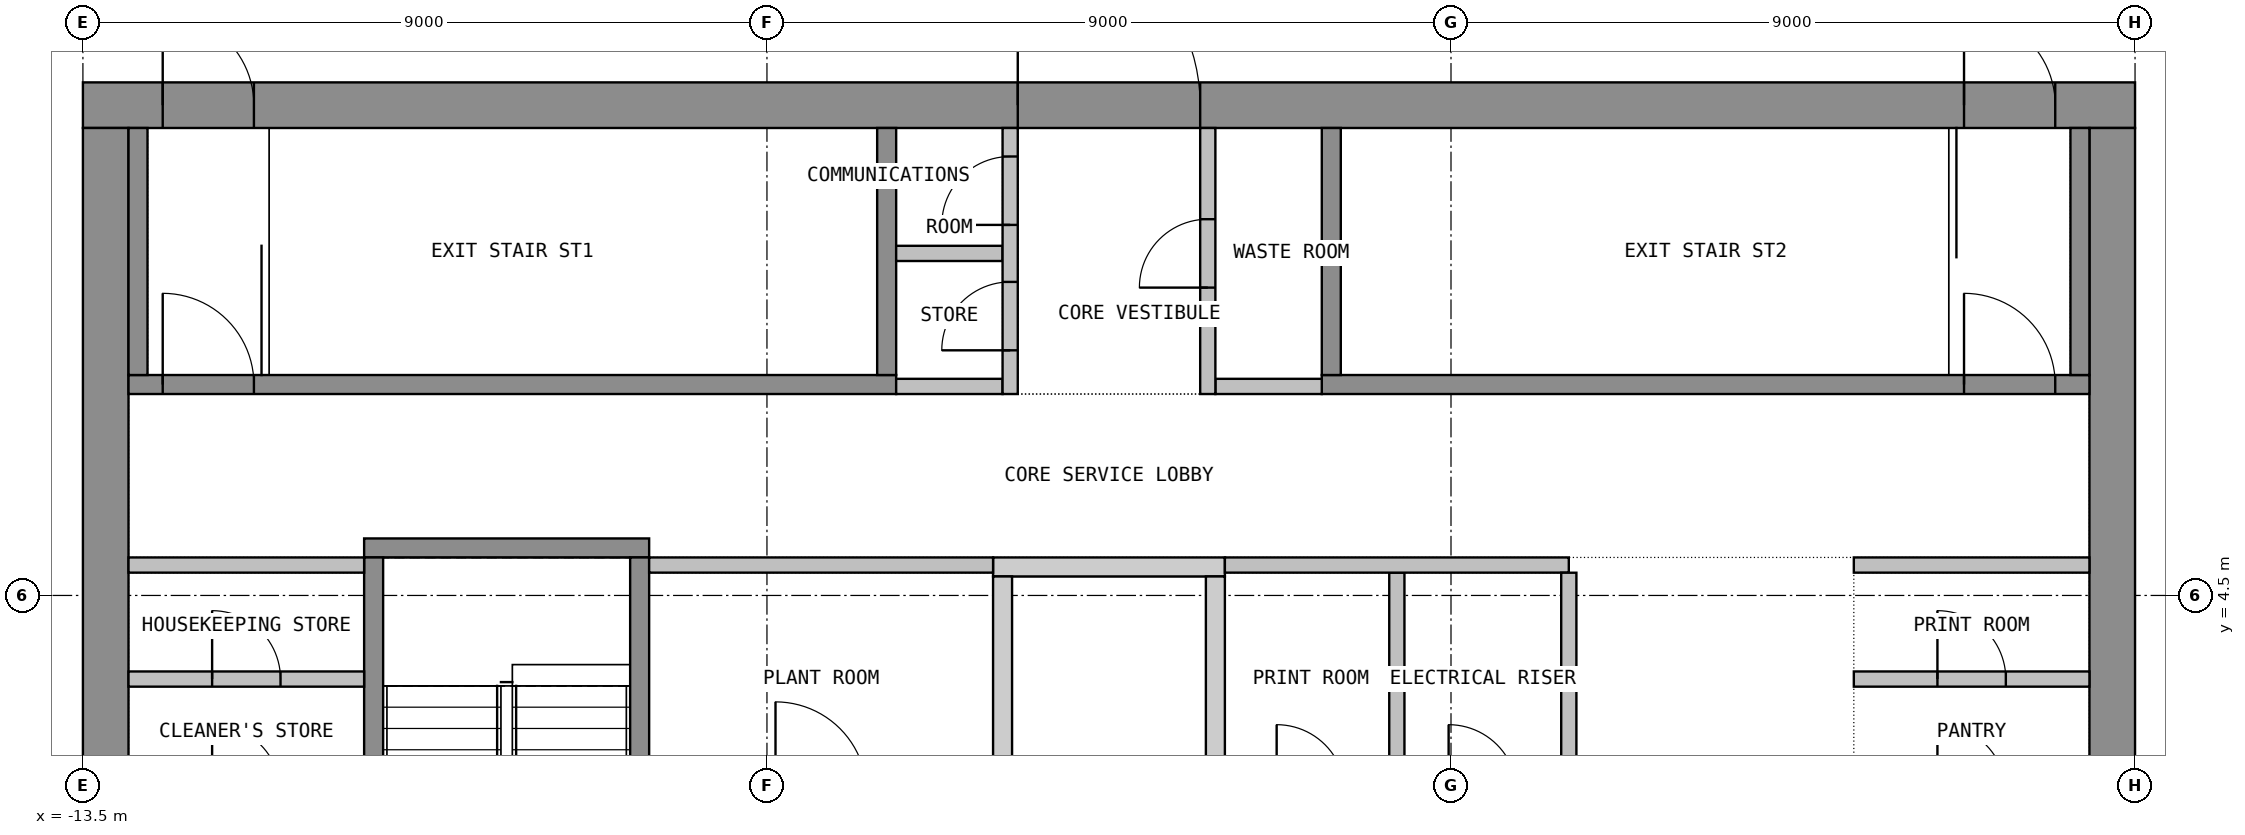
"""IFC4 building model, lengths in metres.
Left out: names, types, materials, properties, quantities, classifications, styles, units other than length and angle.
Written with IfcOpenShell. Run it as: python <this file> out.ifc"""

import sys

from ifc_helpers import new_model, si_unit, direction, frame, frame_2d, origin, place, context, subcontext, project, spatial, polyline, rectangle, outline, extrude, element, fill, save


model = new_model("IFC4")
c1 = context("Model", 3, precision=1e-05, world=origin(), true_north=direction((0.0, 1.0)))
c2 = subcontext(c1, "Body", "Model", "MODEL_VIEW")
j1 = project(units=[si_unit("LENGTHUNIT", "METRE"), si_unit("PLANEANGLEUNIT", "RADIAN")], contexts=[c1])
p1 = place(None, origin())
s1 = spatial("IfcSite", under=j1, at=p1, CompositionType="ELEMENT")
p2 = place(p1, origin())
s2 = spatial("IfcBuilding", under=s1, at=p2, CompositionType="ELEMENT")
p3 = place(p2, frame((0.0, 0.0, 318.9)))
s3 = spatial("IfcBuildingStorey", under=s2, at=p3, CompositionType="ELEMENT", Elevation=318.9)
p4 = place(p3, frame((-13.5, 10.95, 0.0), z_axis=(0.0, 0.0, 1.0), x_axis=(1.0, 0.0, 0.0)))
e1 = element("IfcWall", 1, at=p4, inside=s3, PredefinedType="SHEAR", context=c2, shape_type="SweptSolid", body=[
    extrude(rectangle(XDim=27.0, YDim=0.6, at=frame_2d((13.5, 0.0))), origin(), (0.0, 0.0, 1.0), 3.6),
])
p5 = place(p4, frame((12.3, 0.0, 0.0)))
e2 = element("IfcOpeningElement", 2, at=p5, cuts=e1, PredefinedType="OPENING", context=c2, shape_type="SweptSolid", body=[
    extrude(rectangle(XDim=2.4, YDim=2.1, at=frame_2d((1.2, 1.05))), frame((0.0, 0.31, 0.0), z_axis=(0.0, -1.0, 0.0), x_axis=(1.0, 0.0, 0.0)), (0.0, 0.0, 1.0), 0.62),
])
p6 = place(p4, frame((1.05, 0.0, 0.0)))
e3 = element("IfcOpeningElement", 3, at=p6, cuts=e1, PredefinedType="OPENING", context=c2, shape_type="SweptSolid", body=[
    extrude(rectangle(XDim=1.2, YDim=2.1, at=frame_2d((0.6, 1.05))), frame((0.0, 0.31, 0.0), z_axis=(0.0, -1.0, 0.0), x_axis=(1.0, 0.0, 0.0)), (0.0, 0.0, 1.0), 0.62),
])
p7 = place(p4, frame((24.75, 0.0, 0.0)))
e4 = element("IfcOpeningElement", 4, at=p7, cuts=e1, PredefinedType="OPENING", context=c2, shape_type="SweptSolid", body=[
    extrude(rectangle(XDim=1.2, YDim=2.1, at=frame_2d((0.6, 1.05))), frame((0.0, 0.31, 0.0), z_axis=(0.0, -1.0, 0.0), x_axis=(1.0, 0.0, 0.0)), (0.0, 0.0, 1.0), 0.62),
])
p8 = place(p3, frame((-13.2, -10.65, 0.0), z_axis=(0.0, 0.0, 1.0), x_axis=(0.0, 1.0, 0.0)))
e5 = element("IfcWall", 5, at=p8, inside=s3, PredefinedType="SHEAR", context=c2, shape_type="SweptSolid", body=[
    extrude(rectangle(XDim=21.3, YDim=0.6, at=frame_2d((10.65, 0.0))), origin(), (0.0, 0.0, 1.0), 3.6),
])
p9 = place(p8, frame((9.45, 0.0, 0.0)))
e6 = element("IfcOpeningElement", 6, at=p9, cuts=e5, PredefinedType="OPENING", context=c2, shape_type="SweptSolid", body=[
    extrude(rectangle(XDim=2.4, YDim=2.1, at=frame_2d((1.2, 1.05))), frame((0.0, 0.31, 0.0), z_axis=(0.0, -1.0, 0.0), x_axis=(1.0, 0.0, 0.0)), (0.0, 0.0, 1.0), 0.62),
])
p10 = place(p3, frame((13.2, -10.65, 0.0), z_axis=(0.0, 0.0, 1.0), x_axis=(0.0, 1.0, 0.0)))
e7 = element("IfcWall", 7, at=p10, inside=s3, PredefinedType="SHEAR", context=c2, shape_type="SweptSolid", body=[
    extrude(rectangle(XDim=21.3, YDim=0.6, at=frame_2d((10.65, 0.0))), origin(), (0.0, 0.0, 1.0), 3.6),
])
p11 = place(p10, frame((9.45, 0.0, 0.0)))
e8 = element("IfcOpeningElement", 8, at=p11, cuts=e7, PredefinedType="OPENING", context=c2, shape_type="SweptSolid", body=[
    extrude(rectangle(XDim=2.4, YDim=2.1, at=frame_2d((1.2, 1.05))), frame((0.0, 0.31, 0.0), z_axis=(0.0, -1.0, 0.0), x_axis=(1.0, 0.0, 0.0)), (0.0, 0.0, 1.0), 0.62),
])
p12 = place(p3, origin())
e9 = element("IfcWall", 9, at=p12, inside=s3, PredefinedType="SHEAR", context=c2, shape_type="SweptSolid", body=[
    extrude(outline(polyline([(-1.525, 4.75), (1.525, 4.75), (1.525, 5.0), (-1.525, 5.0), (-1.525, 4.75)])), origin(), (0.0, 0.0, 1.0), 3.6),
])
p13 = place(p3, origin())
e10 = element("IfcWall", 10, at=p13, inside=s3, PredefinedType="SHEAR", context=c2, shape_type="SweptSolid", body=[
    extrude(outline(polyline([(-1.525, 2.05), (-1.275, 2.05), (-1.275, 4.75), (-1.525, 4.75), (-1.525, 2.05)])), origin(), (0.0, 0.0, 1.0), 3.6),
])
p14 = place(p3, origin())
e11 = element("IfcWall", 11, at=p14, inside=s3, PredefinedType="SHEAR", context=c2, shape_type="SweptSolid", body=[
    extrude(outline(polyline([(1.275, 2.05), (1.525, 2.05), (1.525, 4.75), (1.275, 4.75), (1.275, 2.05)])), origin(), (0.0, 0.0, 1.0), 3.6),
])
p15 = place(p3, frame((-12.9, 7.275, 0.0), z_axis=(0.0, 0.0, 1.0), x_axis=(1.0, 0.0, 0.0)))
e12 = element("IfcWall", 12, at=p15, inside=s3, PredefinedType="SHEAR", context=c2, shape_type="SweptSolid", body=[
    extrude(rectangle(XDim=10.1, YDim=0.25, at=frame_2d((5.05, 0.0))), origin(), (0.0, 0.0, 1.0), 3.6),
])
p16 = place(p15, frame((0.45, 0.0, 0.0)))
e13 = element("IfcOpeningElement", 13, at=p16, cuts=e12, PredefinedType="OPENING", context=c2, shape_type="SweptSolid", body=[
    extrude(rectangle(XDim=1.2, YDim=2.1, at=frame_2d((0.6, 1.05))), frame((0.0, 0.135, 0.0), z_axis=(0.0, -1.0, 0.0), x_axis=(1.0, 0.0, 0.0)), (0.0, 0.0, 1.0), 0.27),
])
for number, where, z_axis, x_axis in (
    (14, (-12.775, 7.4, 0.0), (0.0, 0.0, 1.0), (0.0, 1.0, 0.0)),
    (15, (-2.925, 7.4, 0.0), (0.0, 0.0, 1.0), (0.0, 1.0, 0.0)),
):
    element("IfcWall", number, at=place(p3, frame(where, z_axis=z_axis, x_axis=x_axis)), inside=s3, PredefinedType="SHEAR", context=c2, shape_type="SweptSolid", body=[
        extrude(rectangle(XDim=3.25, YDim=0.25, at=frame_2d((1.625, 0.0))), origin(), (0.0, 0.0, 1.0), 3.6),
    ])
p17 = place(p3, frame((2.8, 7.275, 0.0), z_axis=(0.0, 0.0, 1.0), x_axis=(1.0, 0.0, 0.0)))
e16 = element("IfcWall", 16, at=p17, inside=s3, PredefinedType="SHEAR", context=c2, shape_type="SweptSolid", body=[
    extrude(rectangle(XDim=10.1, YDim=0.25, at=frame_2d((5.05, 0.0))), origin(), (0.0, 0.0, 1.0), 3.6),
])
p18 = place(p17, frame((8.45, 0.0, 0.0)))
e17 = element("IfcOpeningElement", 17, at=p18, cuts=e16, PredefinedType="OPENING", context=c2, shape_type="SweptSolid", body=[
    extrude(rectangle(XDim=1.2, YDim=2.1, at=frame_2d((0.6, 1.05))), frame((0.0, 0.135, 0.0), z_axis=(0.0, -1.0, 0.0), x_axis=(1.0, 0.0, 0.0)), (0.0, 0.0, 1.0), 0.27),
])
for number, where, z_axis, x_axis in (
    (18, (2.925, 7.4, 0.0), (0.0, 0.0, 1.0), (0.0, 1.0, 0.0)),
    (19, (12.775, 7.4, 0.0), (0.0, 0.0, 1.0), (0.0, 1.0, 0.0)),
):
    element("IfcWall", number, at=place(p3, frame(where, z_axis=z_axis, x_axis=x_axis)), inside=s3, PredefinedType="SHEAR", context=c2, shape_type="SweptSolid", body=[
        extrude(rectangle(XDim=3.25, YDim=0.25, at=frame_2d((1.625, 0.0))), origin(), (0.0, 0.0, 1.0), 3.6),
    ])
p19 = place(p3, frame((-9.8, 5.125, 0.0), z_axis=(0.0, 0.0, 1.0), x_axis=(1.0, 0.0, 0.0)))
e20 = element("IfcWall", 20, at=p19, inside=s3, PredefinedType="SHEAR", context=c2, shape_type="SweptSolid", body=[
    extrude(rectangle(XDim=3.75, YDim=0.25, at=frame_2d((1.875, 0.0))), origin(), (0.0, 0.0, 1.0), 3.6),
])
p20 = place(p3, frame((-9.675, -1.6, 0.0), z_axis=(0.0, 0.0, 1.0), x_axis=(0.0, 1.0, 0.0)))
e21 = element("IfcWall", 21, at=p20, inside=s3, PredefinedType="SHEAR", context=c2, shape_type="SweptSolid", body=[
    extrude(rectangle(XDim=6.6, YDim=0.25, at=frame_2d((3.3, 0.0))), origin(), (0.0, 0.0, 1.0), 3.6),
])
p21 = place(p3, frame((-6.175, -1.6, 0.0), z_axis=(0.0, 0.0, 1.0), x_axis=(0.0, 1.0, 0.0)))
e22 = element("IfcWall", 22, at=p21, inside=s3, PredefinedType="SHEAR", context=c2, shape_type="SweptSolid", body=[
    extrude(rectangle(XDim=6.6, YDim=0.25, at=frame_2d((3.3, 0.0))), origin(), (0.0, 0.0, 1.0), 3.6),
])
p22 = place(p21, frame((0.2, 0.0, 0.0)))
e23 = element("IfcOpeningElement", 23, at=p22, cuts=e22, PredefinedType="OPENING", context=c2, shape_type="SweptSolid", body=[
    extrude(rectangle(XDim=1.2, YDim=2.1, at=frame_2d((0.6, 1.05))), frame((0.0, 0.135, 0.0), z_axis=(0.0, -1.0, 0.0), x_axis=(1.0, 0.0, 0.0)), (0.0, 0.0, 1.0), 0.27),
])
for number, where, z_axis, x_axis in (
    (24, (-2.8, 7.25, 0.0), (0.0, 0.0, 1.0), (1.0, 0.0, 0.0)),
    (25, (-2.8, 9.0, 0.0), (0.0, 0.0, 1.0), (1.0, 0.0, 0.0)),
    (26, (1.4, 7.25, 0.0), (0.0, 0.0, 1.0), (1.0, 0.0, 0.0)),
):
    element("IfcWall", number, at=place(p3, frame(where, z_axis=z_axis, x_axis=x_axis)), inside=s3, PredefinedType="PARTITIONING", context=c2, shape_type="SweptSolid", body=[
        extrude(rectangle(XDim=1.4, YDim=0.2, at=frame_2d((0.7, 0.0))), origin(), (0.0, 0.0, 1.0), 3.6),
    ])
p23 = place(p3, frame((-1.3, 7.15, 0.0), z_axis=(0.0, 0.0, 1.0), x_axis=(0.0, 1.0, 0.0)))
e27 = element("IfcWall", 27, at=p23, inside=s3, PredefinedType="PARTITIONING", context=c2, shape_type="SweptSolid", body=[
    extrude(rectangle(XDim=3.5, YDim=0.2, at=frame_2d((1.75, 0.0))), origin(), (0.0, 0.0, 1.0), 3.6),
])
p24 = place(p23, frame((0.575, 0.0, 0.0)))
e28 = element("IfcOpeningElement", 28, at=p24, cuts=e27, PredefinedType="OPENING", context=c2, shape_type="SweptSolid", body=[
    extrude(rectangle(XDim=0.9, YDim=2.1, at=frame_2d((0.45, 1.05))), frame((0.0, 0.11, 0.0), z_axis=(0.0, -1.0, 0.0), x_axis=(1.0, 0.0, 0.0)), (0.0, 0.0, 1.0), 0.22),
])
p25 = place(p23, frame((2.225, 0.0, 0.0)))
e29 = element("IfcOpeningElement", 29, at=p25, cuts=e27, PredefinedType="OPENING", context=c2, shape_type="SweptSolid", body=[
    extrude(rectangle(XDim=0.9, YDim=2.1, at=frame_2d((0.45, 1.05))), frame((0.0, 0.11, 0.0), z_axis=(0.0, -1.0, 0.0), x_axis=(1.0, 0.0, 0.0)), (0.0, 0.0, 1.0), 0.22),
])
p26 = place(p3, frame((1.3, 7.15, 0.0), z_axis=(0.0, 0.0, 1.0), x_axis=(0.0, 1.0, 0.0)))
e30 = element("IfcWall", 30, at=p26, inside=s3, PredefinedType="PARTITIONING", context=c2, shape_type="SweptSolid", body=[
    extrude(rectangle(XDim=3.5, YDim=0.2, at=frame_2d((1.75, 0.0))), origin(), (0.0, 0.0, 1.0), 3.6),
])
p27 = place(p26, frame((1.4, 0.0, 0.0)))
e31 = element("IfcOpeningElement", 31, at=p27, cuts=e30, PredefinedType="OPENING", context=c2, shape_type="SweptSolid", body=[
    extrude(rectangle(XDim=0.9, YDim=2.1, at=frame_2d((0.45, 1.05))), frame((0.0, 0.11, 0.0), z_axis=(0.0, -1.0, 0.0), x_axis=(1.0, 0.0, 0.0)), (0.0, 0.0, 1.0), 0.22),
])
p28 = place(p3, frame((-12.9, 3.4, 0.0), z_axis=(0.0, 0.0, 1.0), x_axis=(1.0, 0.0, 0.0)))
e32 = element("IfcWall", 32, at=p28, inside=s3, PredefinedType="PARTITIONING", context=c2, shape_type="SweptSolid", body=[
    extrude(rectangle(XDim=3.1, YDim=0.2, at=frame_2d((1.55, 0.0))), origin(), (0.0, 0.0, 1.0), 3.6),
])
p29 = place(p28, frame((1.1, 0.0, 0.0)))
e33 = element("IfcOpeningElement", 33, at=p29, cuts=e32, PredefinedType="OPENING", context=c2, shape_type="SweptSolid", body=[
    extrude(rectangle(XDim=0.9, YDim=2.1, at=frame_2d((0.45, 1.05))), frame((0.0, 0.11, 0.0), z_axis=(0.0, -1.0, 0.0), x_axis=(1.0, 0.0, 0.0)), (0.0, 0.0, 1.0), 0.22),
])
p30 = place(p3, frame((-12.9, 4.9, 0.0), z_axis=(0.0, 0.0, 1.0), x_axis=(1.0, 0.0, 0.0)))
e34 = element("IfcWall", 34, at=p30, inside=s3, PredefinedType="PARTITIONING", context=c2, shape_type="SweptSolid", body=[
    extrude(rectangle(XDim=3.1, YDim=0.2, at=frame_2d((1.55, 0.0))), origin(), (0.0, 0.0, 1.0), 3.6),
])
p31 = place(p3, frame((-6.05, 4.9, 0.0), z_axis=(0.0, 0.0, 1.0), x_axis=(1.0, 0.0, 0.0)))
e35 = element("IfcWall", 35, at=p31, inside=s3, PredefinedType="PARTITIONING", context=c2, shape_type="SweptSolid", body=[
    extrude(rectangle(XDim=4.525, YDim=0.2, at=frame_2d((2.263, 0.0))), origin(), (0.0, 0.0, 1.0), 3.6),
])
p32 = place(p3, frame((3.788, 2.0, 0.0), z_axis=(0.0, 0.0, 1.0), x_axis=(0.0, 1.0, 0.0)))
e36 = element("IfcWall", 36, at=p32, inside=s3, PredefinedType="PARTITIONING", context=c2, shape_type="SweptSolid", body=[
    extrude(rectangle(XDim=2.8, YDim=0.2, at=frame_2d((1.4, 0.0))), origin(), (0.0, 0.0, 1.0), 3.6),
])
p33 = place(p3, frame((1.525, 4.9, 0.0), z_axis=(0.0, 0.0, 1.0), x_axis=(1.0, 0.0, 0.0)))
e37 = element("IfcWall", 37, at=p33, inside=s3, PredefinedType="PARTITIONING", context=c2, shape_type="SweptSolid", body=[
    extrude(rectangle(XDim=4.525, YDim=0.2, at=frame_2d((2.263, 0.0))), origin(), (0.0, 0.0, 1.0), 3.6),
])
p34 = place(p3, frame((9.8, 3.4, 0.0), z_axis=(0.0, 0.0, 1.0), x_axis=(1.0, 0.0, 0.0)))
e38 = element("IfcWall", 38, at=p34, inside=s3, PredefinedType="PARTITIONING", context=c2, shape_type="SweptSolid", body=[
    extrude(rectangle(XDim=3.1, YDim=0.2, at=frame_2d((1.55, 0.0))), origin(), (0.0, 0.0, 1.0), 3.6),
])
p35 = place(p34, frame((1.1, 0.0, 0.0)))
e39 = element("IfcOpeningElement", 39, at=p35, cuts=e38, PredefinedType="OPENING", context=c2, shape_type="SweptSolid", body=[
    extrude(rectangle(XDim=0.9, YDim=2.1, at=frame_2d((0.45, 1.05))), frame((0.0, 0.11, 0.0), z_axis=(0.0, -1.0, 0.0), x_axis=(1.0, 0.0, 0.0)), (0.0, 0.0, 1.0), 0.22),
])
p36 = place(p3, frame((9.8, 4.9, 0.0), z_axis=(0.0, 0.0, 1.0), x_axis=(1.0, 0.0, 0.0)))
e40 = element("IfcWall", 40, at=p36, inside=s3, PredefinedType="PARTITIONING", context=c2, shape_type="SweptSolid", body=[
    extrude(rectangle(XDim=3.1, YDim=0.2, at=frame_2d((1.55, 0.0))), origin(), (0.0, 0.0, 1.0), 3.6),
])
p37 = place(p3, frame((6.05, 2.001, 0.0), z_axis=(0.0, 0.0, 1.0), x_axis=(0.0, 1.0, 0.0)))
e41 = element("IfcWall", 41, at=p37, inside=s3, PredefinedType="PARTITIONING", context=c2, shape_type="SweptSolid", body=[
    extrude(rectangle(XDim=2.798, YDim=0.2, at=frame_2d((1.399, 0.0))), origin(), (0.0, 0.0, 1.0), 3.6),
])
p38 = place(p5, origin())
e42 = element("IfcDoor", 42, at=p38, inside=s3, OperationType="DOUBLE_DOOR_DOUBLE_SWING", PredefinedType="DOOR", context=c2, shape_type="SweptSolid", body=[
    extrude(rectangle(XDim=2.4, YDim=2.1, at=frame_2d((1.2, 1.05))), frame((0.0, 0.025, 0.0), z_axis=(0.0, -1.0, 0.0), x_axis=(1.0, 0.0, 0.0)), (0.0, 0.0, 1.0), 0.05),
])
fill(e2, e42)
p39 = place(p6, origin())
e43 = element("IfcDoor", 43, at=p39, inside=s3, OperationType="SINGLE_SWING_RIGHT", PredefinedType="DOOR", context=c2, shape_type="SweptSolid", body=[
    extrude(rectangle(XDim=1.2, YDim=2.1, at=frame_2d((0.6, 1.05))), frame((0.0, 0.025, 0.0), z_axis=(0.0, -1.0, 0.0), x_axis=(1.0, 0.0, 0.0)), (0.0, 0.0, 1.0), 0.05),
])
fill(e3, e43)
p40 = place(p7, origin())
e44 = element("IfcDoor", 44, at=p40, inside=s3, OperationType="SINGLE_SWING_RIGHT", PredefinedType="DOOR", context=c2, shape_type="SweptSolid", body=[
    extrude(rectangle(XDim=1.2, YDim=2.1, at=frame_2d((0.6, 1.05))), frame((0.0, 0.025, 0.0), z_axis=(0.0, -1.0, 0.0), x_axis=(1.0, 0.0, 0.0)), (0.0, 0.0, 1.0), 0.05),
])
fill(e4, e44)
p41 = place(p16, origin())
e45 = element("IfcDoor", 45, at=p41, inside=s3, OperationType="SINGLE_SWING_LEFT", PredefinedType="DOOR", context=c2, shape_type="SweptSolid", body=[
    extrude(rectangle(XDim=1.2, YDim=2.1, at=frame_2d((0.6, 1.05))), frame((0.0, 0.025, 0.0), z_axis=(0.0, -1.0, 0.0), x_axis=(1.0, 0.0, 0.0)), (0.0, 0.0, 1.0), 0.05),
])
fill(e13, e45)
p42 = place(p18, origin())
e46 = element("IfcDoor", 46, at=p42, inside=s3, OperationType="SINGLE_SWING_LEFT", PredefinedType="DOOR", context=c2, shape_type="SweptSolid", body=[
    extrude(rectangle(XDim=1.2, YDim=2.1, at=frame_2d((0.6, 1.05))), frame((0.0, 0.025, 0.0), z_axis=(0.0, -1.0, 0.0), x_axis=(1.0, 0.0, 0.0)), (0.0, 0.0, 1.0), 0.05),
])
fill(e17, e46)
p43 = place(p24, origin())
e47 = element("IfcDoor", 47, at=p43, inside=s3, OperationType="SINGLE_SWING_LEFT", PredefinedType="DOOR", context=c2, shape_type="SweptSolid", body=[
    extrude(rectangle(XDim=0.9, YDim=2.1, at=frame_2d((0.45, 1.05))), frame((0.0, 0.025, 0.0), z_axis=(0.0, -1.0, 0.0), x_axis=(1.0, 0.0, 0.0)), (0.0, 0.0, 1.0), 0.05),
])
fill(e28, e47)
p44 = place(p25, origin())
e48 = element("IfcDoor", 48, at=p44, inside=s3, OperationType="SINGLE_SWING_LEFT", PredefinedType="DOOR", context=c2, shape_type="SweptSolid", body=[
    extrude(rectangle(XDim=0.9, YDim=2.1, at=frame_2d((0.45, 1.05))), frame((0.0, 0.025, 0.0), z_axis=(0.0, -1.0, 0.0), x_axis=(1.0, 0.0, 0.0)), (0.0, 0.0, 1.0), 0.05),
])
fill(e29, e48)
p45 = place(p27, origin())
e49 = element("IfcDoor", 49, at=p45, inside=s3, OperationType="SINGLE_SWING_LEFT", PredefinedType="DOOR", context=c2, shape_type="SweptSolid", body=[
    extrude(rectangle(XDim=0.9, YDim=2.1, at=frame_2d((0.45, 1.05))), frame((0.0, 0.025, 0.0), z_axis=(0.0, -1.0, 0.0), x_axis=(1.0, 0.0, 0.0)), (0.0, 0.0, 1.0), 0.05),
])
fill(e31, e49)
p46 = place(p29, origin())
e50 = element("IfcDoor", 50, at=p46, inside=s3, OperationType="SINGLE_SWING_LEFT", PredefinedType="DOOR", context=c2, shape_type="SweptSolid", body=[
    extrude(rectangle(XDim=0.9, YDim=2.1, at=frame_2d((0.45, 1.05))), frame((0.0, 0.025, 0.0), z_axis=(0.0, -1.0, 0.0), x_axis=(1.0, 0.0, 0.0)), (0.0, 0.0, 1.0), 0.05),
])
fill(e33, e50)
p47 = place(p35, origin())
e51 = element("IfcDoor", 51, at=p47, inside=s3, OperationType="SINGLE_SWING_LEFT", PredefinedType="DOOR", context=c2, shape_type="SweptSolid", body=[
    extrude(rectangle(XDim=0.9, YDim=2.1, at=frame_2d((0.45, 1.05))), frame((0.0, 0.025, 0.0), z_axis=(0.0, -1.0, 0.0), x_axis=(1.0, 0.0, 0.0)), (0.0, 0.0, 1.0), 0.05),
])
fill(e39, e51)
save(model, sys.argv[1])
